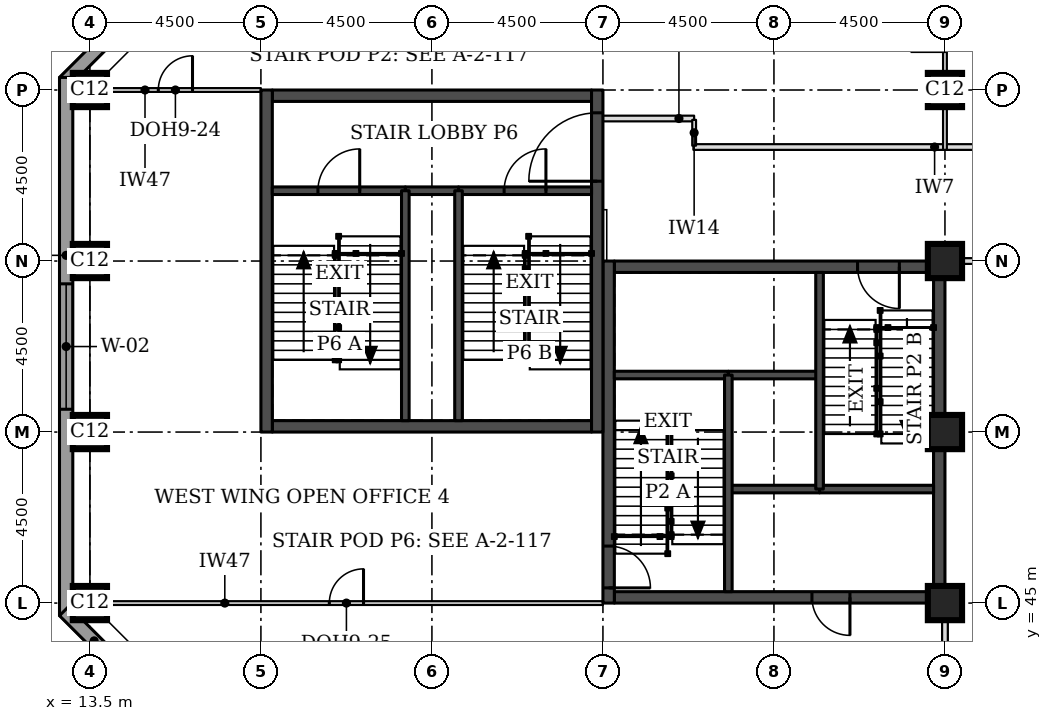
"""IFC4 building model, lengths in metres.
Left out: names, types, materials, properties, quantities, classifications, styles, units other than length and angle.
Written with IfcOpenShell. Run it as: python <this file> out.ifc"""

import sys

from ifc_helpers import new_model, si_unit, direction, frame, frame_2d, origin, origin_2d, place, context, subcontext, project, spatial, rectangle, extrude, element, fill, save


model = new_model("IFC4")
c1 = context("Model", 3, precision=1e-05, world=origin(), true_north=direction((0.0, 1.0)))
c2 = subcontext(c1, "Body", "Model", "MODEL_VIEW")
j1 = project(units=[si_unit("LENGTHUNIT", "METRE"), si_unit("PLANEANGLEUNIT", "RADIAN")], contexts=[c1])
p1 = place(None, origin())
s1 = spatial("IfcSite", under=j1, at=p1, CompositionType="ELEMENT")
p2 = place(p1, origin())
s2 = spatial("IfcBuilding", under=s1, at=p2, CompositionType="ELEMENT")
p3 = place(p2, frame((0.0, 0.0, 211.9)))
s3 = spatial("IfcBuildingStorey", under=s2, at=p3, CompositionType="ELEMENT", Elevation=211.9)
for number, where, z_axis, x_axis in (
    (1, (13.5, 45.0, 0.0), (0.0, 0.0, 1.0), (1.0, 0.0, 0.0)),
    (2, (36.0, 45.0, 0.0), (0.0, 0.0, 1.0), (1.0, 0.0, 0.0)),
    (3, (13.5, 49.5, 0.0), (0.0, 0.0, 1.0), (1.0, 0.0, 0.0)),
    (4, (36.0, 49.5, 0.0), (0.0, 0.0, 1.0), (1.0, 0.0, 0.0)),
    (5, (13.5, 54.0, 0.0), (0.0, 0.0, 1.0), (1.0, 0.0, 0.0)),
    (6, (36.0, 54.0, 0.0), (0.0, 0.0, 1.0), (1.0, 0.0, 0.0)),
    (7, (13.5, 58.5, 0.0), (0.0, 0.0, 1.0), (1.0, 0.0, 0.0)),
    (8, (36.0, 58.5, 0.0), (0.0, 0.0, 1.0), (1.0, 0.0, 0.0)),
):
    element("IfcColumn", number, at=place(p3, frame(where, z_axis=z_axis, x_axis=x_axis)), inside=s3, PredefinedType="COLUMN", context=c2, shape_type="SweptSolid", body=[
        extrude(rectangle(XDim=0.9, YDim=0.9, at=origin_2d()), origin(), (0.0, 0.0, 1.0), 3.7),
    ])
p4 = place(p3, frame((27.3, 45.15, 0.0), z_axis=(0.0, 0.0, 1.0), x_axis=(1.0, 0.0, 0.0)))
e9 = element("IfcWall", 9, at=p4, inside=s3, PredefinedType="SHEAR", context=c2, shape_type="SweptSolid", body=[
    extrude(rectangle(XDim=8.4, YDim=0.3, at=frame_2d((4.2, 0.0))), origin(), (0.0, 0.0, 1.0), 3.7),
])
p5 = place(p4, frame((5.2, 0.0, 0.0)))
e10 = element("IfcOpeningElement", 10, at=p5, cuts=e9, PredefinedType="OPENING", context=c2, shape_type="SweptSolid", body=[
    extrude(rectangle(XDim=1.0, YDim=2.1, at=frame_2d((0.5, 1.05))), frame((0.0, 0.16, 0.0), z_axis=(0.0, -1.0, 0.0), x_axis=(1.0, 0.0, 0.0)), (0.0, 0.0, 1.0), 0.32),
])
p6 = place(p3, frame((27.3, 53.85, 0.0), z_axis=(0.0, 0.0, 1.0), x_axis=(1.0, 0.0, 0.0)))
e11 = element("IfcWall", 11, at=p6, inside=s3, PredefinedType="SHEAR", context=c2, shape_type="SweptSolid", body=[
    extrude(rectangle(XDim=8.4, YDim=0.3, at=frame_2d((4.2, 0.0))), origin(), (0.0, 0.0, 1.0), 3.7),
])
p7 = place(p6, frame((6.4, 0.0, 0.0)))
e12 = element("IfcOpeningElement", 12, at=p7, cuts=e11, PredefinedType="OPENING", context=c2, shape_type="SweptSolid", body=[
    extrude(rectangle(XDim=1.1, YDim=2.1, at=frame_2d((0.55, 1.05))), frame((0.0, 0.16, 0.0), z_axis=(0.0, -1.0, 0.0), x_axis=(1.0, 0.0, 0.0)), (0.0, 0.0, 1.0), 0.32),
])
p8 = place(p3, frame((27.15, 45.0, 0.0), z_axis=(0.0, 0.0, 1.0), x_axis=(0.0, 1.0, 0.0)))
e13 = element("IfcWall", 13, at=p8, inside=s3, PredefinedType="SHEAR", context=c2, shape_type="SweptSolid", body=[
    extrude(rectangle(XDim=9.0, YDim=0.3, at=frame_2d((4.5, 0.0))), origin(), (0.0, 0.0, 1.0), 3.7),
])
p9 = place(p8, frame((0.4, 0.0, 0.0)))
e14 = element("IfcOpeningElement", 14, at=p9, cuts=e13, PredefinedType="OPENING", context=c2, shape_type="SweptSolid", body=[
    extrude(rectangle(XDim=1.1, YDim=2.1, at=frame_2d((0.55, 1.05))), frame((0.0, 0.16, 0.0), z_axis=(0.0, -1.0, 0.0), x_axis=(1.0, 0.0, 0.0)), (0.0, 0.0, 1.0), 0.32),
])
p10 = place(p3, frame((35.85, 45.0, 0.0), z_axis=(0.0, 0.0, 1.0), x_axis=(0.0, 1.0, 0.0)))
e15 = element("IfcWall", 15, at=p10, inside=s3, PredefinedType="SHEAR", context=c2, shape_type="SweptSolid", body=[
    extrude(rectangle(XDim=9.0, YDim=0.3, at=frame_2d((4.5, 0.0))), origin(), (0.0, 0.0, 1.0), 3.7),
])
for number, where, z_axis, x_axis in (
    (16, (18.3, 49.65, 0.0), (0.0, 0.0, 1.0), (1.0, 0.0, 0.0)),
    (17, (18.3, 58.35, 0.0), (0.0, 0.0, 1.0), (1.0, 0.0, 0.0)),
):
    element("IfcWall", number, at=place(p3, frame(where, z_axis=z_axis, x_axis=x_axis)), inside=s3, PredefinedType="SHEAR", context=c2, shape_type="SweptSolid", body=[
        extrude(rectangle(XDim=8.4, YDim=0.3, at=frame_2d((4.2, 0.0))), origin(), (0.0, 0.0, 1.0), 3.7),
    ])
p11 = place(p3, frame((18.15, 49.5, 0.0), z_axis=(0.0, 0.0, 1.0), x_axis=(0.0, 1.0, 0.0)))
e18 = element("IfcWall", 18, at=p11, inside=s3, PredefinedType="SHEAR", context=c2, shape_type="SweptSolid", body=[
    extrude(rectangle(XDim=9.0, YDim=0.3, at=frame_2d((4.5, 0.0))), origin(), (0.0, 0.0, 1.0), 3.7),
])
p12 = place(p3, frame((26.85, 49.5, 0.0), z_axis=(0.0, 0.0, 1.0), x_axis=(0.0, 1.0, 0.0)))
e19 = element("IfcWall", 19, at=p12, inside=s3, PredefinedType="SHEAR", context=c2, shape_type="SweptSolid", body=[
    extrude(rectangle(XDim=9.0, YDim=0.3, at=frame_2d((4.5, 0.0))), origin(), (0.0, 0.0, 1.0), 3.7),
])
p13 = place(p12, frame((6.6, 0.0, 0.0)))
e20 = element("IfcOpeningElement", 20, at=p13, cuts=e19, PredefinedType="OPENING", context=c2, shape_type="SweptSolid", body=[
    extrude(rectangle(XDim=1.8, YDim=2.1, at=frame_2d((0.9, 1.05))), frame((0.0, 0.16, 0.0), z_axis=(0.0, -1.0, 0.0), x_axis=(1.0, 0.0, 0.0)), (0.0, 0.0, 1.0), 0.32),
])
p14 = place(p3, frame((17.792, 63.676, 0.0), z_axis=(0.0, 0.0, 1.0), x_axis=(-0.707106781187, -0.707106781187, 0.0)))
e21 = element("IfcWall", 21, at=p14, inside=s3, PredefinedType="STANDARD", context=c2, shape_type="SweptSolid", body=[
    extrude(rectangle(XDim=7.027, YDim=0.35, at=frame_2d((3.513, 0.0))), origin(), (0.0, 0.0, 1.0), 3.525),
])
p15 = place(p14, frame((1.863, 0.0, 0.9)))
e22 = element("IfcOpeningElement", 22, at=p15, cuts=e21, PredefinedType="OPENING", context=c2, shape_type="SweptSolid", body=[
    extrude(rectangle(XDim=3.3, YDim=1.9, at=frame_2d((1.65, 0.95))), frame((0.0, 0.185, 0.0), z_axis=(0.0, -1.0, 0.0), x_axis=(1.0, 0.0, 0.0)), (0.0, 0.0, 1.0), 0.37),
])
p16 = place(p3, frame((12.875, 58.831, 0.0), z_axis=(0.0, 0.0, 1.0), x_axis=(0.0, -1.0, 0.0)))
e23 = element("IfcWall", 23, at=p16, inside=s3, PredefinedType="STANDARD", context=c2, shape_type="SweptSolid", body=[
    extrude(rectangle(XDim=14.163, YDim=0.35, at=frame_2d((7.081, 0.0))), origin(), (0.0, 0.0, 1.0), 3.525),
])
p17 = place(p16, frame((5.431, 0.0, 0.9)))
e24 = element("IfcOpeningElement", 24, at=p17, cuts=e23, PredefinedType="OPENING", context=c2, shape_type="SweptSolid", body=[
    extrude(rectangle(XDim=3.3, YDim=1.9, at=frame_2d((1.65, 0.95))), frame((0.0, 0.185, 0.0), z_axis=(0.0, -1.0, 0.0), x_axis=(1.0, 0.0, 0.0)), (0.0, 0.0, 1.0), 0.37),
])
p18 = place(p3, frame((12.824, 44.792, 0.0), z_axis=(0.0, 0.0, 1.0), x_axis=(0.707106781187, -0.707106781187, 0.0)))
e25 = element("IfcWall", 25, at=p18, inside=s3, PredefinedType="STANDARD", context=c2, shape_type="SweptSolid", body=[
    extrude(rectangle(XDim=7.027, YDim=0.35, at=frame_2d((3.513, 0.0))), origin(), (0.0, 0.0, 1.0), 3.525),
])
p19 = place(p18, frame((1.863, 0.0, 0.9)))
e26 = element("IfcOpeningElement", 26, at=p19, cuts=e25, PredefinedType="OPENING", context=c2, shape_type="SweptSolid", body=[
    extrude(rectangle(XDim=3.3, YDim=1.9, at=frame_2d((1.65, 0.95))), frame((0.0, 0.185, 0.0), z_axis=(0.0, -1.0, 0.0), x_axis=(1.0, 0.0, 0.0)), (0.0, 0.0, 1.0), 0.37),
])
p20 = place(p3, frame((36.45, 54.0, 0.0), z_axis=(0.0, 0.0, 1.0), x_axis=(1.0, 0.0, 0.0)))
e27 = element("IfcWall", 27, at=p20, inside=s3, PredefinedType="PARTITIONING", context=c2, shape_type="SweptSolid", body=[
    extrude(rectangle(XDim=5.625, YDim=0.15, at=frame_2d((2.812, 0.0))), origin(), (0.0, 0.0, 1.0), 3.55),
])
p21 = place(p3, frame((29.38, 57.0, 0.0), z_axis=(0.0, 0.0, 1.0), x_axis=(1.0, 0.0, 0.0)))
e28 = element("IfcWall", 28, at=p21, inside=s3, PredefinedType="PARTITIONING", context=c2, shape_type="SweptSolid", body=[
    extrude(rectangle(XDim=12.695, YDim=0.15, at=frame_2d((6.348, 0.0))), origin(), (0.0, 0.0, 1.0), 3.55),
])
p22 = place(p3, frame((36.0, 40.95, 0.0), z_axis=(0.0, 0.0, 1.0), x_axis=(0.0, 1.0, 0.0)))
e29 = element("IfcWall", 29, at=p22, inside=s3, PredefinedType="PARTITIONING", context=c2, shape_type="SweptSolid", body=[
    extrude(rectangle(XDim=3.63, YDim=0.15, at=frame_2d((1.815, 0.0))), origin(), (0.0, 0.0, 1.0), 2.8),
])
p23 = place(p22, frame((1.4, 0.0, 0.0)))
e30 = element("IfcOpeningElement", 30, at=p23, cuts=e29, PredefinedType="OPENING", context=c2, shape_type="SweptSolid", body=[
    extrude(rectangle(XDim=0.9, YDim=2.1, at=frame_2d((0.45, 1.05))), frame((0.0, 0.085, 0.0), z_axis=(0.0, -1.0, 0.0), x_axis=(1.0, 0.0, 0.0)), (0.0, 0.0, 1.0), 0.17),
])
p24 = place(p3, frame((36.0, 63.0, 0.0), z_axis=(0.0, 0.0, 1.0), x_axis=(0.0, -1.0, 0.0)))
e31 = element("IfcWall", 31, at=p24, inside=s3, PredefinedType="PARTITIONING", context=c2, shape_type="SweptSolid", body=[
    extrude(rectangle(XDim=6.075, YDim=0.1, at=frame_2d((3.038, 0.0))), origin(), (0.0, 0.0, 1.0), 2.8),
])
p25 = place(p24, frame((2.588, 0.0, 0.0)))
e32 = element("IfcOpeningElement", 32, at=p25, cuts=e31, PredefinedType="OPENING", context=c2, shape_type="SweptSolid", body=[
    extrude(rectangle(XDim=0.9, YDim=2.1, at=frame_2d((0.45, 1.05))), frame((0.0, 0.06, 0.0), z_axis=(0.0, -1.0, 0.0), x_axis=(1.0, 0.0, 0.0)), (0.0, 0.0, 1.0), 0.12),
])
p26 = place(p3, frame((13.5, 58.5, 0.0), z_axis=(0.0, 0.0, 1.0), x_axis=(1.0, 0.0, 0.0)))
e33 = element("IfcWall", 33, at=p26, inside=s3, PredefinedType="PARTITIONING", context=c2, shape_type="SweptSolid", body=[
    extrude(rectangle(XDim=4.5, YDim=0.1, at=frame_2d((2.25, 0.0))), origin(), (0.0, 0.0, 1.0), 2.55),
])
p27 = place(p26, frame((1.8, 0.0, 0.0)))
e34 = element("IfcOpeningElement", 34, at=p27, cuts=e33, PredefinedType="OPENING", context=c2, shape_type="SweptSolid", body=[
    extrude(rectangle(XDim=0.9, YDim=2.1, at=frame_2d((0.45, 1.05))), frame((0.0, 0.06, 0.0), z_axis=(0.0, -1.0, 0.0), x_axis=(1.0, 0.0, 0.0)), (0.0, 0.0, 1.0), 0.12),
])
p28 = place(p3, frame((13.5, 45.0, 0.0), z_axis=(0.0, 0.0, 1.0), x_axis=(1.0, 0.0, 0.0)))
e35 = element("IfcWall", 35, at=p28, inside=s3, PredefinedType="PARTITIONING", context=c2, shape_type="SweptSolid", body=[
    extrude(rectangle(XDim=13.5, YDim=0.1, at=frame_2d((6.75, 0.0))), origin(), (0.0, 0.0, 1.0), 2.55),
])
p29 = place(p28, frame((6.3, 0.0, 0.0)))
e36 = element("IfcOpeningElement", 36, at=p29, cuts=e35, PredefinedType="OPENING", context=c2, shape_type="SweptSolid", body=[
    extrude(rectangle(XDim=0.9, YDim=2.1, at=frame_2d((0.45, 1.05))), frame((0.0, 0.06, 0.0), z_axis=(0.0, -1.0, 0.0), x_axis=(1.0, 0.0, 0.0)), (0.0, 0.0, 1.0), 0.12),
])
p30 = place(p3, frame((27.0, 57.75, 0.0), z_axis=(0.0, 0.0, 1.0), x_axis=(1.0, 0.0, 0.0)))
e37 = element("IfcWall", 37, at=p30, inside=s3, PredefinedType="PARTITIONING", context=c2, shape_type="SweptSolid", body=[
    extrude(rectangle(XDim=2.4, YDim=0.15, at=frame_2d((1.2, 0.0))), origin(), (0.0, 0.0, 1.0), 3.55),
])
p31 = place(p3, frame((29.4, 57.715, 0.0), z_axis=(0.0, 0.0, 1.0), x_axis=(0.0, -1.0, 0.0)))
e38 = element("IfcWall", 38, at=p31, inside=s3, PredefinedType="PARTITIONING", context=c2, shape_type="SweptSolid", body=[
    extrude(rectangle(XDim=0.68, YDim=0.1, at=frame_2d((0.34, 0.0))), origin(), (0.0, 0.0, 1.0), 3.55),
])
p32 = place(p3, frame((30.3, 48.0, 0.0), z_axis=(0.0, 0.0, 1.0), x_axis=(1.0, 0.0, 0.0)))
e39 = element("IfcWall", 39, at=p32, inside=s3, PredefinedType="SOLIDWALL", context=c2, shape_type="SweptSolid", body=[
    extrude(rectangle(XDim=2.4, YDim=0.2, at=frame_2d((1.2, 0.0))), origin(), (0.0, 0.0, 1.0), 3.55),
])
p33 = place(p3, frame((32.7, 48.0, 0.0), z_axis=(0.0, 0.0, 1.0), x_axis=(1.0, 0.0, 0.0)))
e40 = element("IfcWall", 40, at=p33, inside=s3, PredefinedType="SOLIDWALL", context=c2, shape_type="SweptSolid", body=[
    extrude(rectangle(XDim=3.0, YDim=0.2, at=frame_2d((1.5, 0.0))), origin(), (0.0, 0.0, 1.0), 3.55),
])
p34 = place(p3, frame((30.3, 51.0, 0.0), z_axis=(0.0, 0.0, 1.0), x_axis=(1.0, 0.0, 0.0)))
e41 = element("IfcWall", 41, at=p34, inside=s3, PredefinedType="SOLIDWALL", context=c2, shape_type="SweptSolid", body=[
    extrude(rectangle(XDim=2.4, YDim=0.2, at=frame_2d((1.2, 0.0))), origin(), (0.0, 0.0, 1.0), 3.7),
])
p35 = place(p3, frame((27.3, 51.0, 0.0), z_axis=(0.0, 0.0, 1.0), x_axis=(1.0, 0.0, 0.0)))
e42 = element("IfcWall", 42, at=p35, inside=s3, PredefinedType="SOLIDWALL", context=c2, shape_type="SweptSolid", body=[
    extrude(rectangle(XDim=3.0, YDim=0.2, at=frame_2d((1.5, 0.0))), origin(), (0.0, 0.0, 1.0), 3.55),
])
for number, where, z_axis, x_axis in (
    (43, (30.3, 45.3, 0.0), (0.0, 0.0, 1.0), (0.0, 1.0, 0.0)),
    (44, (32.7, 48.0, 0.0), (0.0, 0.0, 1.0), (0.0, 1.0, 0.0)),
):
    element("IfcWall", number, at=place(p3, frame(where, z_axis=z_axis, x_axis=x_axis)), inside=s3, PredefinedType="SOLIDWALL", context=c2, shape_type="SweptSolid", body=[
        extrude(rectangle(XDim=5.7, YDim=0.2, at=frame_2d((2.85, 0.0))), origin(), (0.0, 0.0, 1.0), 3.55),
    ])
p36 = place(p3, frame((21.8, 55.85, 0.0), z_axis=(0.0, 0.0, 1.0), x_axis=(1.0, 0.0, 0.0)))
e45 = element("IfcWall", 45, at=p36, inside=s3, PredefinedType="SOLIDWALL", context=c2, shape_type="SweptSolid", body=[
    extrude(rectangle(XDim=1.4, YDim=0.2, at=frame_2d((0.7, 0.0))), origin(), (0.0, 0.0, 1.0), 3.55),
])
p37 = place(p3, frame((18.3, 55.85, 0.0), z_axis=(0.0, 0.0, 1.0), x_axis=(1.0, 0.0, 0.0)))
e46 = element("IfcWall", 46, at=p37, inside=s3, PredefinedType="SOLIDWALL", context=c2, shape_type="SweptSolid", body=[
    extrude(rectangle(XDim=3.5, YDim=0.2, at=frame_2d((1.75, 0.0))), origin(), (0.0, 0.0, 1.0), 3.55),
])
p38 = place(p37, frame((1.2, 0.0, 0.0)))
e47 = element("IfcOpeningElement", 47, at=p38, cuts=e46, PredefinedType="OPENING", context=c2, shape_type="SweptSolid", body=[
    extrude(rectangle(XDim=1.1, YDim=2.1, at=frame_2d((0.55, 1.05))), frame((0.0, 0.11, 0.0), z_axis=(0.0, -1.0, 0.0), x_axis=(1.0, 0.0, 0.0)), (0.0, 0.0, 1.0), 0.22),
])
p39 = place(p3, frame((23.2, 55.85, 0.0), z_axis=(0.0, 0.0, 1.0), x_axis=(1.0, 0.0, 0.0)))
e48 = element("IfcWall", 48, at=p39, inside=s3, PredefinedType="SOLIDWALL", context=c2, shape_type="SweptSolid", body=[
    extrude(rectangle(XDim=3.5, YDim=0.2, at=frame_2d((1.75, 0.0))), origin(), (0.0, 0.0, 1.0), 3.55),
])
p40 = place(p39, frame((1.2, 0.0, 0.0)))
e49 = element("IfcOpeningElement", 49, at=p40, cuts=e48, PredefinedType="OPENING", context=c2, shape_type="SweptSolid", body=[
    extrude(rectangle(XDim=1.1, YDim=2.1, at=frame_2d((0.55, 1.05))), frame((0.0, 0.11, 0.0), z_axis=(0.0, -1.0, 0.0), x_axis=(1.0, 0.0, 0.0)), (0.0, 0.0, 1.0), 0.22),
])
for number, where, z_axis, x_axis in (
    (50, (21.8, 49.8, 0.0), (0.0, 0.0, 1.0), (0.0, 1.0, 0.0)),
    (51, (23.2, 49.8, 0.0), (0.0, 0.0, 1.0), (0.0, 1.0, 0.0)),
):
    element("IfcWall", number, at=place(p3, frame(where, z_axis=z_axis, x_axis=x_axis)), inside=s3, PredefinedType="SOLIDWALL", context=c2, shape_type="SweptSolid", body=[
        extrude(rectangle(XDim=6.05, YDim=0.2, at=frame_2d((3.025, 0.0))), origin(), (0.0, 0.0, 1.0), 3.55),
    ])
p41 = place(p17, origin())
e52 = element("IfcWindow", 52, at=p41, inside=s3, PartitioningType="SINGLE_PANEL", PredefinedType="WINDOW", context=c2, shape_type="SweptSolid", body=[
    extrude(rectangle(XDim=3.3, YDim=1.9, at=frame_2d((1.65, 0.95))), frame((0.0, 0.085, 0.0), z_axis=(0.0, -1.0, 0.0), x_axis=(1.0, 0.0, 0.0)), (0.0, 0.0, 1.0), 0.06),
])
fill(e24, e52)
p42 = place(p27, origin())
e53 = element("IfcDoor", 53, at=p42, inside=s3, OperationType="SINGLE_SWING_RIGHT", PredefinedType="DOOR", context=c2, shape_type="SweptSolid", body=[
    extrude(rectangle(XDim=0.9, YDim=2.1, at=frame_2d((0.45, 1.05))), frame((0.0, 0.025, 0.0), z_axis=(0.0, -1.0, 0.0), x_axis=(1.0, 0.0, 0.0)), (0.0, 0.0, 1.0), 0.05),
])
fill(e34, e53)
p43 = place(p29, origin())
e54 = element("IfcDoor", 54, at=p43, inside=s3, OperationType="SINGLE_SWING_RIGHT", PredefinedType="DOOR", context=c2, shape_type="SweptSolid", body=[
    extrude(rectangle(XDim=0.9, YDim=2.1, at=frame_2d((0.45, 1.05))), frame((0.0, 0.025, 0.0), z_axis=(0.0, -1.0, 0.0), x_axis=(1.0, 0.0, 0.0)), (0.0, 0.0, 1.0), 0.05),
])
fill(e36, e54)
p44 = place(p9, frame((1.1, 0.0, 0.0), z_axis=(0.0, 0.0, 1.0), x_axis=(-1.0, 0.0, 0.0)))
e55 = element("IfcDoor", 55, at=p44, inside=s3, OperationType="SINGLE_SWING_RIGHT", PredefinedType="DOOR", context=c2, shape_type="SweptSolid", body=[
    extrude(rectangle(XDim=1.1, YDim=2.1, at=frame_2d((0.55, 1.05))), frame((0.0, 0.025, 0.0), z_axis=(0.0, -1.0, 0.0), x_axis=(1.0, 0.0, 0.0)), (0.0, 0.0, 1.0), 0.05),
])
fill(e14, e55)
p45 = place(p7, frame((1.1, 0.0, 0.0), z_axis=(0.0, 0.0, 1.0), x_axis=(-1.0, 0.0, 0.0)))
e56 = element("IfcDoor", 56, at=p45, inside=s3, OperationType="SINGLE_SWING_LEFT", PredefinedType="DOOR", context=c2, shape_type="SweptSolid", body=[
    extrude(rectangle(XDim=1.1, YDim=2.1, at=frame_2d((0.55, 1.05))), frame((0.0, 0.025, 0.0), z_axis=(0.0, -1.0, 0.0), x_axis=(1.0, 0.0, 0.0)), (0.0, 0.0, 1.0), 0.05),
])
fill(e12, e56)
p46 = place(p5, frame((1.0, 0.0, 0.0), z_axis=(0.0, 0.0, 1.0), x_axis=(-1.0, 0.0, 0.0)))
e57 = element("IfcDoor", 57, at=p46, inside=s3, OperationType="SINGLE_SWING_LEFT", PredefinedType="DOOR", context=c2, shape_type="SweptSolid", body=[
    extrude(rectangle(XDim=1.0, YDim=2.1, at=frame_2d((0.5, 1.05))), frame((0.0, 0.025, 0.0), z_axis=(0.0, -1.0, 0.0), x_axis=(1.0, 0.0, 0.0)), (0.0, 0.0, 1.0), 0.05),
])
fill(e10, e57)
p47 = place(p38, origin())
e58 = element("IfcDoor", 58, at=p47, inside=s3, OperationType="SINGLE_SWING_RIGHT", PredefinedType="DOOR", context=c2, shape_type="SweptSolid", body=[
    extrude(rectangle(XDim=1.1, YDim=2.1, at=frame_2d((0.55, 1.05))), frame((0.0, 0.025, 0.0), z_axis=(0.0, -1.0, 0.0), x_axis=(1.0, 0.0, 0.0)), (0.0, 0.0, 1.0), 0.05),
])
fill(e47, e58)
p48 = place(p40, origin())
e59 = element("IfcDoor", 59, at=p48, inside=s3, OperationType="SINGLE_SWING_RIGHT", PredefinedType="DOOR", context=c2, shape_type="SweptSolid", body=[
    extrude(rectangle(XDim=1.1, YDim=2.1, at=frame_2d((0.55, 1.05))), frame((0.0, 0.025, 0.0), z_axis=(0.0, -1.0, 0.0), x_axis=(1.0, 0.0, 0.0)), (0.0, 0.0, 1.0), 0.05),
])
fill(e49, e59)
p49 = place(p13, origin())
e60 = element("IfcDoor", 60, at=p49, inside=s3, OperationType="SINGLE_SWING_LEFT", PredefinedType="DOOR", context=c2, shape_type="SweptSolid", body=[
    extrude(rectangle(XDim=1.8, YDim=2.1, at=frame_2d((0.9, 1.05))), frame((0.0, 0.025, 0.0), z_axis=(0.0, -1.0, 0.0), x_axis=(1.0, 0.0, 0.0)), (0.0, 0.0, 1.0), 0.05),
])
fill(e20, e60)
save(model, sys.argv[1])
